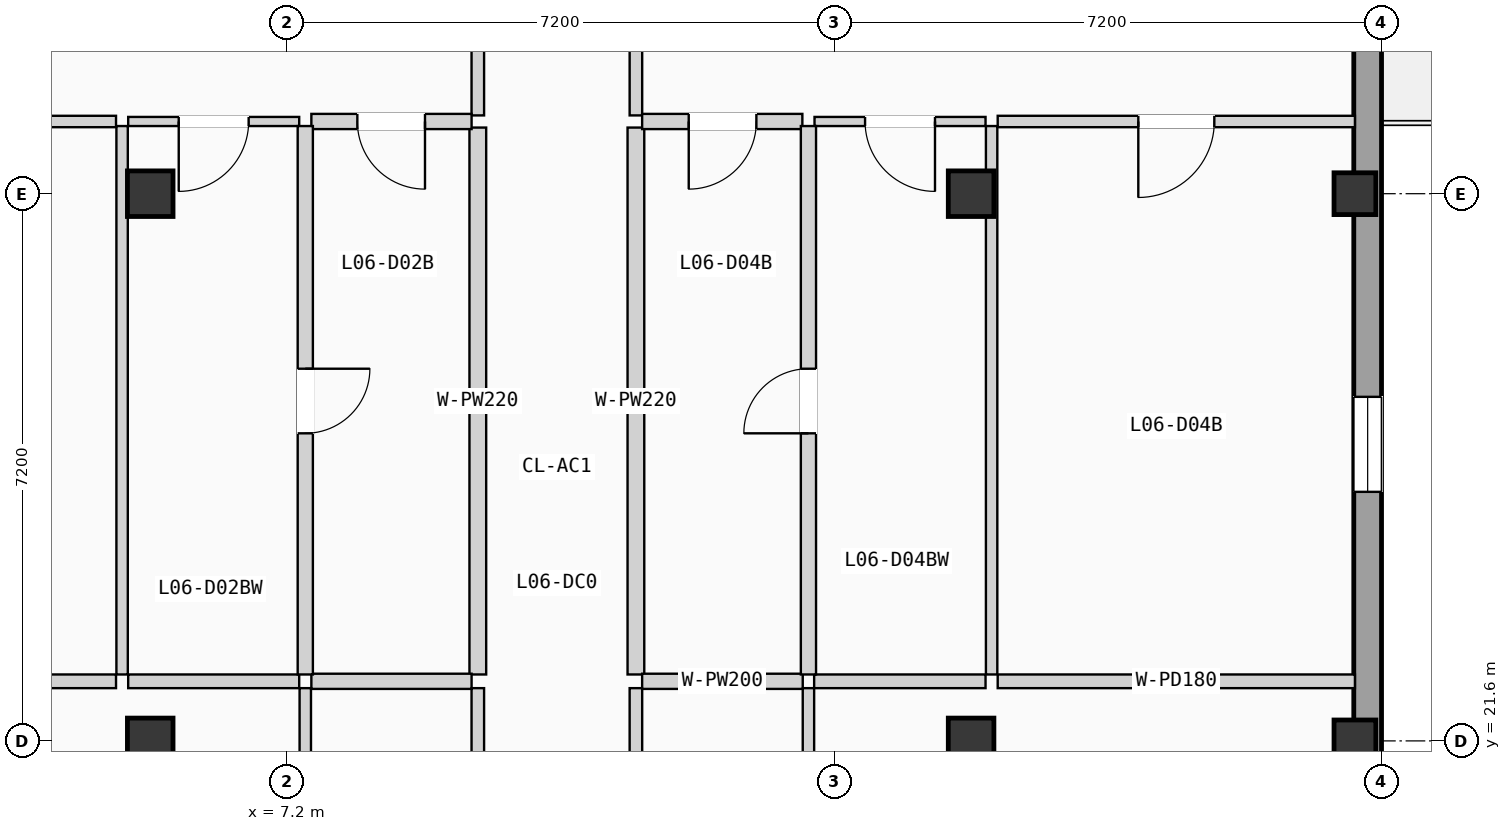
"""IFC4 building model, lengths in metres.
Left out: names, types, materials, properties, quantities, classifications, styles, units other than length and angle.
Written with IfcOpenShell. Run it as: python <this file> out.ifc"""

import sys

from ifc_helpers import new_model, si_unit, direction, frame, frame_2d, origin, origin_2d, place, context, subcontext, project, spatial, rectangle, extrude, element, fill, save


model = new_model("IFC4")
c1 = context("Model", 3, precision=1e-05, world=origin(), true_north=direction((0.0, 1.0)))
c2 = subcontext(c1, "Body", "Model", "MODEL_VIEW")
j1 = project(units=[si_unit("LENGTHUNIT", "METRE"), si_unit("PLANEANGLEUNIT", "RADIAN")], contexts=[c1])
p1 = place(None, origin())
s1 = spatial("IfcSite", under=j1, at=p1, CompositionType="ELEMENT")
p2 = place(p1, origin())
s2 = spatial("IfcBuilding", under=s1, at=p2, CompositionType="ELEMENT")
p3 = place(p2, frame((0.0, 0.0, 21.525)))
s3 = spatial("IfcBuildingStorey", under=s2, at=p3, CompositionType="ELEMENT", Elevation=21.525)
for number, where, z_axis, x_axis in (
    (1, (5.4, 21.6, 0.0), (0.0, 0.0, 1.0), (1.0, 0.0, 0.0)),
    (2, (5.4, 28.8, 0.0), (0.0, 0.0, 1.0), (1.0, 0.0, 0.0)),
    (3, (16.2, 21.6, 0.0), (0.0, 0.0, 1.0), (1.0, 0.0, 0.0)),
    (4, (16.2, 28.8, 0.0), (0.0, 0.0, 1.0), (1.0, 0.0, 0.0)),
):
    element("IfcColumn", number, at=place(p3, frame(where, z_axis=z_axis, x_axis=x_axis)), inside=s3, PredefinedType="COLUMN", context=c2, shape_type="SweptSolid", body=[
        extrude(rectangle(XDim=0.6, YDim=0.6, at=origin_2d()), origin(), (0.0, 0.0, 1.0), 3.15),
    ])
for number, where, z_axis, x_axis in (
    (5, (21.25, 21.6, 0.0), (0.0, 0.0, 1.0), (1.0, 0.0, 0.0)),
    (6, (21.25, 28.8, 0.0), (0.0, 0.0, 1.0), (1.0, 0.0, 0.0)),
):
    element("IfcColumn", number, at=place(p3, frame(where, z_axis=z_axis, x_axis=x_axis)), inside=s3, PredefinedType="COLUMN", context=c2, shape_type="SweptSolid", body=[
        extrude(rectangle(XDim=0.55, YDim=0.55, at=origin_2d()), origin(), (0.0, 0.0, 1.0), 3.15),
    ])
p4 = place(p3, frame((21.417, 0.365, 0.0), z_axis=(0.0, 0.0, 1.0), x_axis=(0.0, 1.0, 0.0)))
e7 = element("IfcWall", 7, at=p4, inside=s3, PredefinedType="SOLIDWALL", context=c2, shape_type="SweptSolid", body=[
    extrude(rectangle(XDim=49.67, YDim=0.365, at=frame_2d((24.835, 0.0))), origin(), (0.0, 0.0, 1.0), 2.89),
])
p5 = place(p4, frame((15.739, 0.0, 0.0)))
e8 = element("IfcOpeningElement", 8, at=p5, cuts=e7, PredefinedType="OPENING", context=c2, shape_type="SweptSolid", body=[
    extrude(rectangle(XDim=0.95, YDim=2.15, at=frame_2d((0.475, 1.075))), frame((0.0, 0.192, 0.0), z_axis=(0.0, -1.0, 0.0), x_axis=(1.0, 0.0, 0.0)), (0.0, 0.0, 1.0), 0.385),
])
p6 = place(p4, frame((8.847, 0.0, 0.9)))
e9 = element("IfcOpeningElement", 9, at=p6, cuts=e7, PredefinedType="OPENING", context=c2, shape_type="SweptSolid", body=[
    extrude(rectangle(XDim=1.25, YDim=1.2, at=frame_2d((0.625, 0.6))), frame((0.0, 0.192, 0.0), z_axis=(0.0, -1.0, 0.0), x_axis=(1.0, 0.0, 0.0)), (0.0, 0.0, 1.0), 0.385),
])
p7 = place(p4, frame((18.585, 0.0, 0.855)))
e10 = element("IfcOpeningElement", 10, at=p7, cuts=e7, PredefinedType="OPENING", context=c2, shape_type="SweptSolid", body=[
    extrude(rectangle(XDim=1.25, YDim=1.35, at=frame_2d((0.625, 0.675))), frame((0.0, 0.192, 0.0), z_axis=(0.0, -1.0, 0.0), x_axis=(1.0, 0.0, 0.0)), (0.0, 0.0, 1.0), 0.385),
])
p8 = place(p4, frame((32.32, 0.0, 0.0)))
e11 = element("IfcOpeningElement", 11, at=p8, cuts=e7, PredefinedType="OPENING", context=c2, shape_type="SweptSolid", body=[
    extrude(rectangle(XDim=1.08, YDim=2.18, at=frame_2d((0.54, 1.09))), frame((0.0, 0.192, 0.0), z_axis=(0.0, -1.0, 0.0), x_axis=(1.0, 0.0, 0.0)), (0.0, 0.0, 1.0), 0.385),
])
p9 = place(p4, frame((24.512, 0.0, 0.705)))
e12 = element("IfcOpeningElement", 12, at=p9, cuts=e7, PredefinedType="OPENING", context=c2, shape_type="SweptSolid", body=[
    extrude(rectangle(XDim=1.25, YDim=1.5, at=frame_2d((0.625, 0.75))), frame((0.0, 0.192, 0.0), z_axis=(0.0, -1.0, 0.0), x_axis=(1.0, 0.0, 0.0)), (0.0, 0.0, 1.0), 0.385),
])
p10 = place(p4, frame((38.545, 0.0, 0.555)))
e13 = element("IfcOpeningElement", 13, at=p10, cuts=e7, PredefinedType="OPENING", context=c2, shape_type="SweptSolid", body=[
    extrude(rectangle(XDim=1.25, YDim=1.65, at=frame_2d((0.625, 0.825))), frame((0.0, 0.192, 0.0), z_axis=(0.0, -1.0, 0.0), x_axis=(1.0, 0.0, 0.0)), (0.0, 0.0, 1.0), 0.385),
])
p11 = place(p3, frame((9.71, 17.819, 0.0), z_axis=(0.0, 0.0, 1.0), x_axis=(0.0, 1.0, 0.0)))
e14 = element("IfcWall", 14, at=p11, inside=s3, PredefinedType="PARTITIONING", context=c2, shape_type="SweptSolid", body=[
    extrude(rectangle(XDim=4.475, YDim=0.165, at=frame_2d((2.237, 0.0))), origin(), (0.0, 0.0, 1.0), 2.87),
])
p12 = place(p3, frame((9.71, 29.83, 0.0), z_axis=(0.0, 0.0, 1.0), x_axis=(0.0, 1.0, 0.0)))
e15 = element("IfcWall", 15, at=p12, inside=s3, PredefinedType="PARTITIONING", context=c2, shape_type="SweptSolid", body=[
    extrude(rectangle(XDim=5.14, YDim=0.165, at=frame_2d((2.57, 0.0))), origin(), (0.0, 0.0, 1.0), 2.87),
])
p13 = place(p12, frame((2.045, 0.0, 0.0)))
e16 = element("IfcOpeningElement", 16, at=p13, cuts=e15, PredefinedType="OPENING", context=c2, shape_type="SweptSolid", body=[
    extrude(rectangle(XDim=1.05, YDim=2.13, at=frame_2d((0.525, 1.065))), frame((0.0, 0.093, 0.0), z_axis=(0.0, -1.0, 0.0), x_axis=(1.0, 0.0, 0.0)), (0.0, 0.0, 1.0), 0.185),
])
p14 = place(p3, frame((9.71, 22.474, 0.0), z_axis=(0.0, 0.0, 1.0), x_axis=(0.0, 1.0, 0.0)))
e17 = element("IfcWall", 17, at=p14, inside=s3, PredefinedType="PLUMBINGWALL", context=c2, shape_type="SweptSolid", body=[
    extrude(rectangle(XDim=7.196, YDim=0.22, at=frame_2d((3.598, 0.0))), origin(), (0.0, 0.0, 1.0), 2.87),
])
p15 = place(p3, frame((11.79, 17.819, 0.0), z_axis=(0.0, 0.0, 1.0), x_axis=(0.0, 1.0, 0.0)))
e18 = element("IfcWall", 18, at=p15, inside=s3, PredefinedType="PARTITIONING", context=c2, shape_type="SweptSolid", body=[
    extrude(rectangle(XDim=4.475, YDim=0.165, at=frame_2d((2.237, 0.0))), origin(), (0.0, 0.0, 1.0), 2.87),
])
p16 = place(p3, frame((11.79, 29.83, 0.0), z_axis=(0.0, 0.0, 1.0), x_axis=(0.0, 1.0, 0.0)))
e19 = element("IfcWall", 19, at=p16, inside=s3, PredefinedType="PARTITIONING", context=c2, shape_type="SweptSolid", body=[
    extrude(rectangle(XDim=5.14, YDim=0.165, at=frame_2d((2.57, 0.0))), origin(), (0.0, 0.0, 1.0), 2.87),
])
p17 = place(p16, frame((2.045, 0.0, 0.0)))
e20 = element("IfcOpeningElement", 20, at=p17, cuts=e19, PredefinedType="OPENING", context=c2, shape_type="SweptSolid", body=[
    extrude(rectangle(XDim=1.05, YDim=2.13, at=frame_2d((0.525, 1.065))), frame((0.0, 0.093, 0.0), z_axis=(0.0, -1.0, 0.0), x_axis=(1.0, 0.0, 0.0)), (0.0, 0.0, 1.0), 0.185),
])
p18 = place(p3, frame((11.79, 22.474, 0.0), z_axis=(0.0, 0.0, 1.0), x_axis=(0.0, 1.0, 0.0)))
e21 = element("IfcWall", 21, at=p18, inside=s3, PredefinedType="PLUMBINGWALL", context=c2, shape_type="SweptSolid", body=[
    extrude(rectangle(XDim=7.196, YDim=0.22, at=frame_2d((3.598, 0.0))), origin(), (0.0, 0.0, 1.0), 2.87),
])
p19 = place(p3, frame((7.44, 17.799, 0.0), z_axis=(0.0, 0.0, 1.0), x_axis=(0.0, 1.0, 0.0)))
e22 = element("IfcWall", 22, at=p19, inside=s3, PredefinedType="PARTITIONING", context=c2, shape_type="SweptSolid", body=[
    extrude(rectangle(XDim=4.495, YDim=0.15, at=frame_2d((2.248, 0.0))), origin(), (0.0, 0.0, 1.0), 2.87),
])
p20 = place(p3, frame((7.52, 22.384, 0.0), z_axis=(0.0, 0.0, 1.0), x_axis=(1.0, 0.0, 0.0)))
e23 = element("IfcWall", 23, at=p20, inside=s3, PredefinedType="PLUMBINGWALL", context=c2, shape_type="SweptSolid", body=[
    extrude(rectangle(XDim=2.108, YDim=0.2, at=frame_2d((1.054, 0.0))), origin(), (0.0, 0.0, 1.0), 2.87),
])
p21 = place(p3, frame((0.35, 22.384, 0.0), z_axis=(0.0, 0.0, 1.0), x_axis=(1.0, 0.0, 0.0)))
e24 = element("IfcWall", 24, at=p21, inside=s3, PredefinedType="PARTITIONING", context=c2, shape_type="SweptSolid", body=[
    extrude(rectangle(XDim=4.6, YDim=0.18, at=frame_2d((2.3, 0.0))), origin(), (0.0, 0.0, 1.0), 2.87),
])
p22 = place(p3, frame((5.11, 22.384, 0.0), z_axis=(0.0, 0.0, 1.0), x_axis=(1.0, 0.0, 0.0)))
e25 = element("IfcWall", 25, at=p22, inside=s3, PredefinedType="PARTITIONING", context=c2, shape_type="SweptSolid", body=[
    extrude(rectangle(XDim=2.25, YDim=0.18, at=frame_2d((1.125, 0.0))), origin(), (0.0, 0.0, 1.0), 2.87),
])
p23 = place(p3, frame((7.52, 29.75, 0.0), z_axis=(0.0, 0.0, 1.0), x_axis=(1.0, 0.0, 0.0)))
e26 = element("IfcWall", 26, at=p23, inside=s3, PredefinedType="PLUMBINGWALL", context=c2, shape_type="SweptSolid", body=[
    extrude(rectangle(XDim=2.108, YDim=0.2, at=frame_2d((1.054, 0.0))), origin(), (0.0, 0.0, 1.0), 2.87),
])
p24 = place(p23, frame((0.605, 0.0, 0.0)))
e27 = element("IfcOpeningElement", 27, at=p24, cuts=e26, PredefinedType="OPENING", context=c2, shape_type="SweptSolid", body=[
    extrude(rectangle(XDim=0.89, YDim=2.03, at=frame_2d((0.445, 1.015))), frame((0.0, 0.11, 0.0), z_axis=(0.0, -1.0, 0.0), x_axis=(1.0, 0.0, 0.0)), (0.0, 0.0, 1.0), 0.22),
])
p25 = place(p3, frame((0.35, 29.75, 0.0), z_axis=(0.0, 0.0, 1.0), x_axis=(1.0, 0.0, 0.0)))
e28 = element("IfcWall", 28, at=p25, inside=s3, PredefinedType="PARTITIONING", context=c2, shape_type="SweptSolid", body=[
    extrude(rectangle(XDim=4.6, YDim=0.15, at=frame_2d((2.3, 0.0))), origin(), (0.0, 0.0, 1.0), 2.87),
])
p26 = place(p25, frame((1.78, 0.0, 0.0)))
e29 = element("IfcOpeningElement", 29, at=p26, cuts=e28, PredefinedType="OPENING", context=c2, shape_type="SweptSolid", body=[
    extrude(rectangle(XDim=1.04, YDim=2.08, at=frame_2d((0.52, 1.04))), frame((0.0, 0.085, 0.0), z_axis=(0.0, -1.0, 0.0), x_axis=(1.0, 0.0, 0.0)), (0.0, 0.0, 1.0), 0.17),
])
p27 = place(p3, frame((5.11, 29.75, 0.0), z_axis=(0.0, 0.0, 1.0), x_axis=(1.0, 0.0, 0.0)))
e30 = element("IfcWall", 30, at=p27, inside=s3, PredefinedType="PARTITIONING", context=c2, shape_type="SweptSolid", body=[
    extrude(rectangle(XDim=2.25, YDim=0.12, at=frame_2d((1.125, 0.0))), origin(), (0.0, 0.0, 1.0), 2.87),
])
p28 = place(p27, frame((0.665, 0.0, 0.0)))
e31 = element("IfcOpeningElement", 31, at=p28, cuts=e30, PredefinedType="OPENING", context=c2, shape_type="SweptSolid", body=[
    extrude(rectangle(XDim=0.92, YDim=2.02, at=frame_2d((0.46, 1.01))), frame((0.0, 0.07, 0.0), z_axis=(0.0, -1.0, 0.0), x_axis=(1.0, 0.0, 0.0)), (0.0, 0.0, 1.0), 0.14),
])
p29 = place(p3, frame((7.44, 22.474, 0.0), z_axis=(0.0, 0.0, 1.0), x_axis=(0.0, 1.0, 0.0)))
e32 = element("IfcWall", 32, at=p29, inside=s3, PredefinedType="PLUMBINGWALL", context=c2, shape_type="SweptSolid", body=[
    extrude(rectangle(XDim=7.216, YDim=0.2, at=frame_2d((3.608, 0.0))), origin(), (0.0, 0.0, 1.0), 2.87),
])
p30 = place(p29, frame((3.173, 0.0, 0.0)))
e33 = element("IfcOpeningElement", 33, at=p30, cuts=e32, PredefinedType="OPENING", context=c2, shape_type="SweptSolid", body=[
    extrude(rectangle(XDim=0.85, YDim=2.01, at=frame_2d((0.425, 1.005))), frame((0.0, 0.11, 0.0), z_axis=(0.0, -1.0, 0.0), x_axis=(1.0, 0.0, 0.0)), (0.0, 0.0, 1.0), 0.22),
])
p31 = place(p3, frame((5.03, 22.474, 0.0), z_axis=(0.0, 0.0, 1.0), x_axis=(0.0, 1.0, 0.0)))
e34 = element("IfcWall", 34, at=p31, inside=s3, PredefinedType="PARTITIONING", context=c2, shape_type="SweptSolid", body=[
    extrude(rectangle(XDim=7.216, YDim=0.15, at=frame_2d((3.608, 0.0))), origin(), (0.0, 0.0, 1.0), 2.87),
])
p32 = place(p3, frame((14.06, 17.799, 0.0), z_axis=(0.0, 0.0, 1.0), x_axis=(0.0, 1.0, 0.0)))
e35 = element("IfcWall", 35, at=p32, inside=s3, PredefinedType="PARTITIONING", context=c2, shape_type="SweptSolid", body=[
    extrude(rectangle(XDim=4.495, YDim=0.15, at=frame_2d((2.248, 0.0))), origin(), (0.0, 0.0, 1.0), 2.87),
])
p33 = place(p3, frame((11.872, 22.384, 0.0), z_axis=(0.0, 0.0, 1.0), x_axis=(1.0, 0.0, 0.0)))
e36 = element("IfcWall", 36, at=p33, inside=s3, PredefinedType="PLUMBINGWALL", context=c2, shape_type="SweptSolid", body=[
    extrude(rectangle(XDim=2.113, YDim=0.2, at=frame_2d((1.057, 0.0))), origin(), (0.0, 0.0, 1.0), 2.87),
])
p34 = place(p3, frame((16.55, 22.384, 0.0), z_axis=(0.0, 0.0, 1.0), x_axis=(1.0, 0.0, 0.0)))
e37 = element("IfcWall", 37, at=p34, inside=s3, PredefinedType="PARTITIONING", context=c2, shape_type="SweptSolid", body=[
    extrude(rectangle(XDim=4.7, YDim=0.18, at=frame_2d((2.35, 0.0))), origin(), (0.0, 0.0, 1.0), 2.87),
])
p35 = place(p3, frame((14.135, 22.384, 0.0), z_axis=(0.0, 0.0, 1.0), x_axis=(1.0, 0.0, 0.0)))
e38 = element("IfcWall", 38, at=p35, inside=s3, PredefinedType="PARTITIONING", context=c2, shape_type="SweptSolid", body=[
    extrude(rectangle(XDim=2.255, YDim=0.18, at=frame_2d((1.127, 0.0))), origin(), (0.0, 0.0, 1.0), 2.87),
])
p36 = place(p3, frame((11.872, 29.75, 0.0), z_axis=(0.0, 0.0, 1.0), x_axis=(1.0, 0.0, 0.0)))
e39 = element("IfcWall", 39, at=p36, inside=s3, PredefinedType="PLUMBINGWALL", context=c2, shape_type="SweptSolid", body=[
    extrude(rectangle(XDim=2.108, YDim=0.2, at=frame_2d((1.054, 0.0))), origin(), (0.0, 0.0, 1.0), 2.87),
])
p37 = place(p36, frame((0.613, 0.0, 0.0)))
e40 = element("IfcOpeningElement", 40, at=p37, cuts=e39, PredefinedType="OPENING", context=c2, shape_type="SweptSolid", body=[
    extrude(rectangle(XDim=0.89, YDim=2.03, at=frame_2d((0.445, 1.015))), frame((0.0, 0.11, 0.0), z_axis=(0.0, -1.0, 0.0), x_axis=(1.0, 0.0, 0.0)), (0.0, 0.0, 1.0), 0.22),
])
p38 = place(p3, frame((16.55, 29.75, 0.0), z_axis=(0.0, 0.0, 1.0), x_axis=(1.0, 0.0, 0.0)))
e41 = element("IfcWall", 41, at=p38, inside=s3, PredefinedType="PARTITIONING", context=c2, shape_type="SweptSolid", body=[
    extrude(rectangle(XDim=4.7, YDim=0.15, at=frame_2d((2.35, 0.0))), origin(), (0.0, 0.0, 1.0), 2.87),
])
p39 = place(p38, frame((1.85, 0.0, 0.0)))
e42 = element("IfcOpeningElement", 42, at=p39, cuts=e41, PredefinedType="OPENING", context=c2, shape_type="SweptSolid", body=[
    extrude(rectangle(XDim=1.0, YDim=2.06, at=frame_2d((0.5, 1.03))), frame((0.0, 0.085, 0.0), z_axis=(0.0, -1.0, 0.0), x_axis=(1.0, 0.0, 0.0)), (0.0, 0.0, 1.0), 0.17),
])
p40 = place(p3, frame((14.14, 29.75, 0.0), z_axis=(0.0, 0.0, 1.0), x_axis=(1.0, 0.0, 0.0)))
e43 = element("IfcWall", 43, at=p40, inside=s3, PredefinedType="PARTITIONING", context=c2, shape_type="SweptSolid", body=[
    extrude(rectangle(XDim=2.25, YDim=0.12, at=frame_2d((1.125, 0.0))), origin(), (0.0, 0.0, 1.0), 2.87),
])
p41 = place(p40, frame((0.665, 0.0, 0.0)))
e44 = element("IfcOpeningElement", 44, at=p41, cuts=e43, PredefinedType="OPENING", context=c2, shape_type="SweptSolid", body=[
    extrude(rectangle(XDim=0.92, YDim=2.02, at=frame_2d((0.46, 1.01))), frame((0.0, 0.07, 0.0), z_axis=(0.0, -1.0, 0.0), x_axis=(1.0, 0.0, 0.0)), (0.0, 0.0, 1.0), 0.14),
])
p42 = place(p3, frame((14.06, 22.474, 0.0), z_axis=(0.0, 0.0, 1.0), x_axis=(0.0, 1.0, 0.0)))
e45 = element("IfcWall", 45, at=p42, inside=s3, PredefinedType="PLUMBINGWALL", context=c2, shape_type="SweptSolid", body=[
    extrude(rectangle(XDim=7.216, YDim=0.2, at=frame_2d((3.608, 0.0))), origin(), (0.0, 0.0, 1.0), 2.87),
])
p43 = place(p42, frame((3.173, 0.0, 0.0)))
e46 = element("IfcOpeningElement", 46, at=p43, cuts=e45, PredefinedType="OPENING", context=c2, shape_type="SweptSolid", body=[
    extrude(rectangle(XDim=0.85, YDim=2.01, at=frame_2d((0.425, 1.005))), frame((0.0, 0.11, 0.0), z_axis=(0.0, -1.0, 0.0), x_axis=(1.0, 0.0, 0.0)), (0.0, 0.0, 1.0), 0.22),
])
p44 = place(p3, frame((16.47, 22.474, 0.0), z_axis=(0.0, 0.0, 1.0), x_axis=(0.0, 1.0, 0.0)))
e47 = element("IfcWall", 47, at=p44, inside=s3, PredefinedType="PARTITIONING", context=c2, shape_type="SweptSolid", body=[
    extrude(rectangle(XDim=7.216, YDim=0.15, at=frame_2d((3.608, 0.0))), origin(), (0.0, 0.0, 1.0), 2.87),
])
p45 = place(p9, origin())
e48 = element("IfcWindow", 48, at=p45, inside=s3, PartitioningType="SINGLE_PANEL", PredefinedType="WINDOW", context=c2, shape_type="SweptSolid", body=[
    extrude(rectangle(XDim=1.25, YDim=1.5, at=frame_2d((0.625, 0.75))), frame((0.0, 0.03, 0.0), z_axis=(0.0, -1.0, 0.0), x_axis=(1.0, 0.0, 0.0)), (0.0, 0.0, 1.0), 0.06),
])
fill(e12, e48)
p46 = place(p24, frame((0.89, 0.0, 0.0), z_axis=(0.0, 0.0, 1.0), x_axis=(-1.0, 0.0, 0.0)))
e49 = element("IfcDoor", 49, at=p46, inside=s3, OperationType="SINGLE_SWING_RIGHT", PredefinedType="DOOR", context=c2, shape_type="SweptSolid", body=[
    extrude(rectangle(XDim=0.89, YDim=2.03, at=frame_2d((0.445, 1.015))), frame((0.0, 0.025, 0.0), z_axis=(0.0, -1.0, 0.0), x_axis=(1.0, 0.0, 0.0)), (0.0, 0.0, 1.0), 0.05),
])
fill(e27, e49)
p47 = place(p28, frame((0.92, 0.0, 0.0), z_axis=(0.0, 0.0, 1.0), x_axis=(-1.0, 0.0, 0.0)))
e50 = element("IfcDoor", 50, at=p47, inside=s3, OperationType="SINGLE_SWING_LEFT", PredefinedType="DOOR", context=c2, shape_type="SweptSolid", body=[
    extrude(rectangle(XDim=0.92, YDim=2.02, at=frame_2d((0.46, 1.01))), frame((0.0, 0.025, 0.0), z_axis=(0.0, -1.0, 0.0), x_axis=(1.0, 0.0, 0.0)), (0.0, 0.0, 1.0), 0.05),
])
fill(e31, e50)
p48 = place(p30, frame((0.85, 0.0, 0.0), z_axis=(0.0, 0.0, 1.0), x_axis=(-1.0, 0.0, 0.0)))
e51 = element("IfcDoor", 51, at=p48, inside=s3, OperationType="SINGLE_SWING_RIGHT", PredefinedType="DOOR", context=c2, shape_type="SweptSolid", body=[
    extrude(rectangle(XDim=0.85, YDim=2.01, at=frame_2d((0.425, 1.005))), frame((0.0, 0.025, 0.0), z_axis=(0.0, -1.0, 0.0), x_axis=(1.0, 0.0, 0.0)), (0.0, 0.0, 1.0), 0.05),
])
fill(e33, e51)
p49 = place(p37, frame((0.89, 0.0, 0.0), z_axis=(0.0, 0.0, 1.0), x_axis=(-1.0, 0.0, 0.0)))
e52 = element("IfcDoor", 52, at=p49, inside=s3, OperationType="SINGLE_SWING_LEFT", PredefinedType="DOOR", context=c2, shape_type="SweptSolid", body=[
    extrude(rectangle(XDim=0.89, YDim=2.03, at=frame_2d((0.445, 1.015))), frame((0.0, 0.025, 0.0), z_axis=(0.0, -1.0, 0.0), x_axis=(1.0, 0.0, 0.0)), (0.0, 0.0, 1.0), 0.05),
])
fill(e40, e52)
p50 = place(p39, frame((1.0, 0.0, 0.0), z_axis=(0.0, 0.0, 1.0), x_axis=(-1.0, 0.0, 0.0)))
e53 = element("IfcDoor", 53, at=p50, inside=s3, OperationType="SINGLE_SWING_LEFT", PredefinedType="DOOR", context=c2, shape_type="SweptSolid", body=[
    extrude(rectangle(XDim=1.0, YDim=2.06, at=frame_2d((0.5, 1.03))), frame((0.0, 0.025, 0.0), z_axis=(0.0, -1.0, 0.0), x_axis=(1.0, 0.0, 0.0)), (0.0, 0.0, 1.0), 0.05),
])
fill(e42, e53)
p51 = place(p41, frame((0.92, 0.0, 0.0), z_axis=(0.0, 0.0, 1.0), x_axis=(-1.0, 0.0, 0.0)))
e54 = element("IfcDoor", 54, at=p51, inside=s3, OperationType="SINGLE_SWING_RIGHT", PredefinedType="DOOR", context=c2, shape_type="SweptSolid", body=[
    extrude(rectangle(XDim=0.92, YDim=2.02, at=frame_2d((0.46, 1.01))), frame((0.0, 0.025, 0.0), z_axis=(0.0, -1.0, 0.0), x_axis=(1.0, 0.0, 0.0)), (0.0, 0.0, 1.0), 0.05),
])
fill(e44, e54)
p52 = place(p43, origin())
e55 = element("IfcDoor", 55, at=p52, inside=s3, OperationType="SINGLE_SWING_LEFT", PredefinedType="DOOR", context=c2, shape_type="SweptSolid", body=[
    extrude(rectangle(XDim=0.85, YDim=2.01, at=frame_2d((0.425, 1.005))), frame((0.0, 0.025, 0.0), z_axis=(0.0, -1.0, 0.0), x_axis=(1.0, 0.0, 0.0)), (0.0, 0.0, 1.0), 0.05),
])
fill(e46, e55)
save(model, sys.argv[1])
